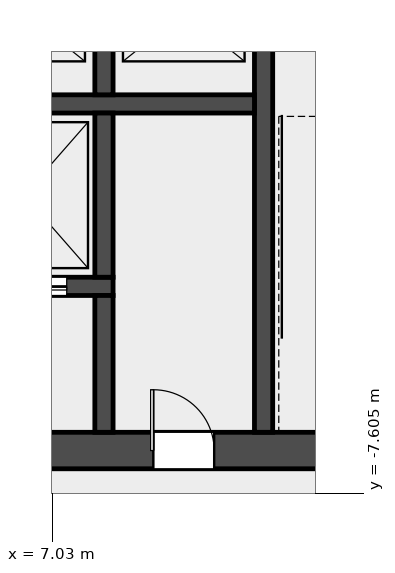
"""IFC4 building model, lengths in metres.
Left out: names, types, materials, properties, quantities, classifications, styles, units other than length and angle.
Written with IfcOpenShell. Run it as: python <this file> out.ifc"""

import sys

from ifc_helpers import new_model, si_unit, direction, frame, frame_2d, origin, place, context, subcontext, project, spatial, rectangle, extrude, element, fill, save


model = new_model("IFC4")
c1 = context("Model", 3, precision=1e-05, world=origin(), true_north=direction((0.0, 1.0)))
c2 = subcontext(c1, "Body", "Model", "MODEL_VIEW")
j1 = project(units=[si_unit("LENGTHUNIT", "METRE"), si_unit("PLANEANGLEUNIT", "RADIAN")], contexts=[c1])
p1 = place(None, origin())
s1 = spatial("IfcSite", under=j1, at=p1, CompositionType="ELEMENT")
p2 = place(p1, origin())
s2 = spatial("IfcBuilding", under=s1, at=p2, CompositionType="ELEMENT")
p3 = place(p2, frame((0.0, 0.0, 69.4)))
s3 = spatial("IfcBuildingStorey", under=s2, at=p3, CompositionType="ELEMENT", Elevation=69.4)
p4 = place(p3, frame((-14.4, -6.9, 0.0), z_axis=(0.0, 0.0, 1.0), x_axis=(1.0, 0.0, 0.0)))
e1 = element("IfcWall", 1, at=p4, inside=s3, PredefinedType="SHEAR", context=c2, shape_type="SweptSolid", body=[
    extrude(rectangle(XDim=28.8, YDim=0.6, at=frame_2d((14.4, 0.0))), origin(), (0.0, 0.0, 1.0), 4.5),
])
p5 = place(p4, frame((4.337, 0.0, 0.0)))
e2 = element("IfcOpeningElement", 2, at=p5, cuts=e1, PredefinedType="OPENING", context=c2, shape_type="SweptSolid", body=[
    extrude(rectangle(XDim=1.0, YDim=2.1, at=frame_2d((0.5, 1.05))), frame((0.0, 0.312, 0.0), z_axis=(0.0, -1.0, 0.0), x_axis=(1.0, 0.0, 0.0)), (0.0, 0.0, 1.0), 0.624),
])
p6 = place(p4, frame((6.212, 0.0, 0.0)))
e3 = element("IfcOpeningElement", 3, at=p6, cuts=e1, PredefinedType="OPENING", context=c2, shape_type="SweptSolid", body=[
    extrude(rectangle(XDim=1.0, YDim=2.1, at=frame_2d((0.5, 1.05))), frame((0.0, 0.312, 0.0), z_axis=(0.0, -1.0, 0.0), x_axis=(1.0, 0.0, 0.0)), (0.0, 0.0, 1.0), 0.624),
])
p7 = place(p4, frame((10.8, 0.0, 0.0)))
e4 = element("IfcOpeningElement", 4, at=p7, cuts=e1, PredefinedType="OPENING", context=c2, shape_type="SweptSolid", body=[
    extrude(rectangle(XDim=1.2, YDim=2.1, at=frame_2d((0.6, 1.05))), frame((0.0, 0.312, 0.0), z_axis=(0.0, -1.0, 0.0), x_axis=(1.0, 0.0, 0.0)), (0.0, 0.0, 1.0), 0.624),
])
p8 = place(p4, frame((15.587, 0.0, 0.0)))
e5 = element("IfcOpeningElement", 5, at=p8, cuts=e1, PredefinedType="OPENING", context=c2, shape_type="SweptSolid", body=[
    extrude(rectangle(XDim=1.0, YDim=2.1, at=frame_2d((0.5, 1.05))), frame((0.0, 0.312, 0.0), z_axis=(0.0, -1.0, 0.0), x_axis=(1.0, 0.0, 0.0)), (0.0, 0.0, 1.0), 0.624),
])
p9 = place(p4, frame((18.75, 0.0, 0.0)))
e6 = element("IfcOpeningElement", 6, at=p9, cuts=e1, PredefinedType="OPENING", context=c2, shape_type="SweptSolid", body=[
    extrude(rectangle(XDim=1.8, YDim=2.1, at=frame_2d((0.9, 1.05))), frame((0.0, 0.312, 0.0), z_axis=(0.0, -1.0, 0.0), x_axis=(1.0, 0.0, 0.0)), (0.0, 0.0, 1.0), 0.624),
])
p10 = place(p4, frame((23.087, 0.0, 0.0)))
e7 = element("IfcOpeningElement", 7, at=p10, cuts=e1, PredefinedType="OPENING", context=c2, shape_type="SweptSolid", body=[
    extrude(rectangle(XDim=1.0, YDim=2.1, at=frame_2d((0.5, 1.05))), frame((0.0, 0.312, 0.0), z_axis=(0.0, -1.0, 0.0), x_axis=(1.0, 0.0, 0.0)), (0.0, 0.0, 1.0), 0.624),
])
p11 = place(p3, frame((10.5, -6.6, 0.0), z_axis=(0.0, 0.0, 1.0), x_axis=(0.0, 1.0, 0.0)))
e8 = element("IfcWall", 8, at=p11, inside=s3, PredefinedType="SHEAR", context=c2, shape_type="SweptSolid", body=[
    extrude(rectangle(XDim=8.55, YDim=0.3, at=frame_2d((4.275, 0.0))), origin(), (0.0, 0.0, 1.0), 4.5),
])
p12 = place(p3, frame((-10.35, -1.2, 0.0), z_axis=(0.0, 0.0, 1.0), x_axis=(1.0, 0.0, 0.0)))
e9 = element("IfcWall", 9, at=p12, inside=s3, PredefinedType="SOLIDWALL", context=c2, shape_type="SweptSolid", body=[
    extrude(rectangle(XDim=20.7, YDim=0.3, at=frame_2d((10.35, 0.0))), origin(), (0.0, 0.0, 1.0), 4.5),
])
p13 = place(p3, frame((7.875, -1.05, 0.0), z_axis=(0.0, 0.0, 1.0), x_axis=(0.0, 1.0, 0.0)))
e10 = element("IfcWall", 10, at=p13, inside=s3, PredefinedType="SOLIDWALL", context=c2, shape_type="SweptSolid", body=[
    extrude(rectangle(XDim=2.7, YDim=0.3, at=frame_2d((1.35, 0.0))), origin(), (0.0, 0.0, 1.0), 4.5),
])
p14 = place(p3, frame((2.475, -4.2, 0.0), z_axis=(0.0, 0.0, 1.0), x_axis=(1.0, 0.0, 0.0)))
e11 = element("IfcWall", 11, at=p14, inside=s3, PredefinedType="SOLIDWALL", context=c2, shape_type="SweptSolid", body=[
    extrude(rectangle(XDim=5.55, YDim=0.3, at=frame_2d((2.775, 0.0))), origin(), (0.0, 0.0, 1.0), 4.5),
])
p15 = place(p14, frame((0.762, 0.0, 0.0)))
e12 = element("IfcOpeningElement", 12, at=p15, cuts=e11, PredefinedType="OPENING", context=c2, shape_type="SweptSolid", body=[
    extrude(rectangle(XDim=1.4, YDim=2.1, at=frame_2d((0.7, 1.05))), frame((0.0, 0.162, 0.0), z_axis=(0.0, -1.0, 0.0), x_axis=(1.0, 0.0, 0.0)), (0.0, 0.0, 1.0), 0.324),
])
p16 = place(p14, frame((3.387, 0.0, 0.0)))
e13 = element("IfcOpeningElement", 13, at=p16, cuts=e11, PredefinedType="OPENING", context=c2, shape_type="SweptSolid", body=[
    extrude(rectangle(XDim=1.4, YDim=2.1, at=frame_2d((0.7, 1.05))), frame((0.0, 0.162, 0.0), z_axis=(0.0, -1.0, 0.0), x_axis=(1.0, 0.0, 0.0)), (0.0, 0.0, 1.0), 0.324),
])
p17 = place(p3, frame((7.875, -4.05, 0.0), z_axis=(0.0, 0.0, 1.0), x_axis=(0.0, 1.0, 0.0)))
e14 = element("IfcWall", 14, at=p17, inside=s3, PredefinedType="SOLIDWALL", context=c2, shape_type="SweptSolid", body=[
    extrude(rectangle(XDim=2.7, YDim=0.3, at=frame_2d((1.35, 0.0))), origin(), (0.0, 0.0, 1.0), 4.5),
])
p18 = place(p3, frame((7.875, -6.6, 0.0), z_axis=(0.0, 0.0, 1.0), x_axis=(0.0, 1.0, 0.0)))
e15 = element("IfcWall", 15, at=p18, inside=s3, PredefinedType="SOLIDWALL", context=c2, shape_type="SweptSolid", body=[
    extrude(rectangle(XDim=2.25, YDim=0.3, at=frame_2d((1.125, 0.0))), origin(), (0.0, 0.0, 1.0), 4.5),
])
p19 = place(p16, origin())
e16 = element("IfcDoor", 16, at=p19, inside=s3, OperationType="DOUBLE_DOOR_SLIDING", PredefinedType="DOOR", context=c2, shape_type="SweptSolid", body=[
    extrude(rectangle(XDim=1.4, YDim=2.1, at=frame_2d((0.7, 1.05))), frame((0.0, 0.025, 0.0), z_axis=(0.0, -1.0, 0.0), x_axis=(1.0, 0.0, 0.0)), (0.0, 0.0, 1.0), 0.05),
])
fill(e13, e16)
p20 = place(p10, origin())
e17 = element("IfcDoor", 17, at=p20, inside=s3, OperationType="SINGLE_SWING_LEFT", PredefinedType="DOOR", context=c2, shape_type="SweptSolid", body=[
    extrude(rectangle(XDim=1.0, YDim=2.1, at=frame_2d((0.5, 1.05))), frame((0.0, 0.025, 0.0), z_axis=(0.0, -1.0, 0.0), x_axis=(1.0, 0.0, 0.0)), (0.0, 0.0, 1.0), 0.05),
])
fill(e7, e17)
save(model, sys.argv[1])
